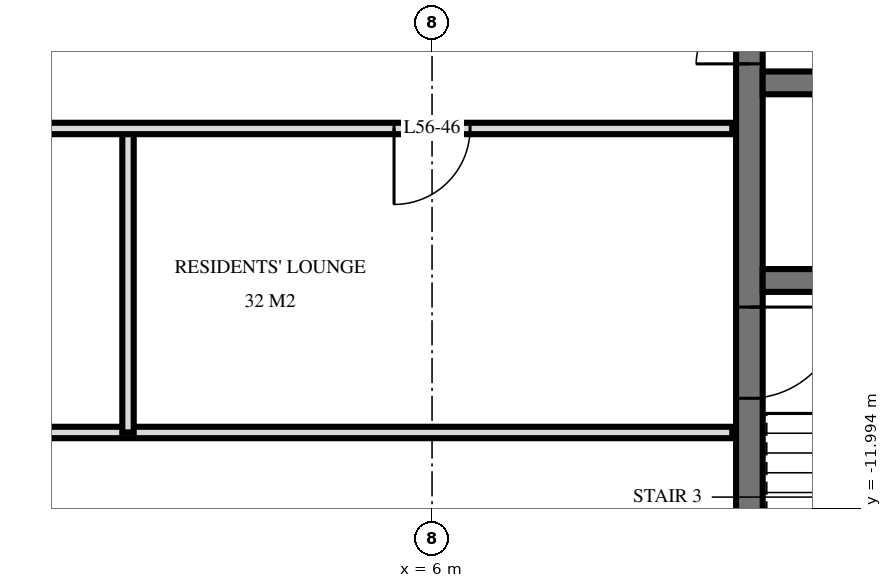
"""IFC4 building model, lengths in metres.
Left out: names, types, materials, properties, quantities, classifications, styles, units other than length and angle.
Written with IfcOpenShell. Run it as: python <this file> out.ifc"""

import sys

from ifc_helpers import new_model, si_unit, direction, frame, frame_2d, origin, place, context, subcontext, project, spatial, rectangle, extrude, element, fill, save


model = new_model("IFC4")
c1 = context("Model", 3, precision=1e-05, world=origin(), true_north=direction((0.0, 1.0)))
c2 = subcontext(c1, "Body", "Model", "MODEL_VIEW")
j1 = project(units=[si_unit("LENGTHUNIT", "METRE"), si_unit("PLANEANGLEUNIT", "RADIAN")], contexts=[c1])
p1 = place(None, origin())
s1 = spatial("IfcSite", under=j1, at=p1, CompositionType="ELEMENT")
p2 = place(p1, origin())
s2 = spatial("IfcBuilding", under=s1, at=p2, CompositionType="ELEMENT")
p3 = place(p2, frame((0.0, 0.0, 215.1)))
s3 = spatial("IfcBuildingStorey", under=s2, at=p3, CompositionType="ELEMENT", Elevation=215.1)
p4 = place(p3, frame((10.175, -14.55, 0.0), z_axis=(0.0, 0.0, 1.0), x_axis=(0.0, 1.0, 0.0)))
e1 = element("IfcWall", 1, at=p4, inside=s3, PredefinedType="SHEAR", context=c2, shape_type="SweptSolid", body=[
    extrude(rectangle(XDim=14.1, YDim=0.35, at=frame_2d((7.05, 0.0))), origin(), (0.0, 0.0, 1.0), 3.5),
])
p5 = place(p4, frame((8.4, 0.0, 0.0)))
e2 = element("IfcOpeningElement", 2, at=p5, cuts=e1, PredefinedType="OPENING", context=c2, shape_type="SweptSolid", body=[
    extrude(rectangle(XDim=1.4, YDim=2.4, at=frame_2d((0.7, 1.2))), frame((0.0, 0.185, 0.0), z_axis=(0.0, -1.0, 0.0), x_axis=(1.0, 0.0, 0.0)), (0.0, 0.0, 1.0), 0.37),
])
p6 = place(p4, frame((10.0, 0.0, 0.0)))
e3 = element("IfcOpeningElement", 3, at=p6, cuts=e1, PredefinedType="OPENING", context=c2, shape_type="SweptSolid", body=[
    extrude(rectangle(XDim=1.4, YDim=2.4, at=frame_2d((0.7, 1.2))), frame((0.0, 0.185, 0.0), z_axis=(0.0, -1.0, 0.0), x_axis=(1.0, 0.0, 0.0)), (0.0, 0.0, 1.0), 0.37),
])
p7 = place(p4, frame((4.0, 0.0, 0.0)))
e4 = element("IfcOpeningElement", 4, at=p7, cuts=e1, PredefinedType="OPENING", context=c2, shape_type="SweptSolid", body=[
    extrude(rectangle(XDim=1.2, YDim=2.1, at=frame_2d((0.6, 1.05))), frame((0.0, 0.185, 0.0), z_axis=(0.0, -1.0, 0.0), x_axis=(1.0, 0.0, 0.0)), (0.0, 0.0, 1.0), 0.37),
])
p8 = place(p3, frame((10.35, -6.4, 0.0), z_axis=(0.0, 0.0, 1.0), x_axis=(1.0, 0.0, 0.0)))
e5 = element("IfcWall", 5, at=p8, inside=s3, PredefinedType="SHEAR", context=c2, shape_type="SweptSolid", body=[
    extrude(rectangle(XDim=13.7, YDim=0.3, at=frame_2d((6.85, 0.0))), origin(), (0.0, 0.0, 1.0), 3.5),
])
p9 = place(p8, frame((12.05, 0.0, 0.0)))
e6 = element("IfcOpeningElement", 6, at=p9, cuts=e5, PredefinedType="OPENING", context=c2, shape_type="SweptSolid", body=[
    extrude(rectangle(XDim=1.1, YDim=2.1, at=frame_2d((0.55, 1.05))), frame((0.0, 0.16, 0.0), z_axis=(0.0, -1.0, 0.0), x_axis=(1.0, 0.0, 0.0)), (0.0, 0.0, 1.0), 0.32),
])
p10 = place(p8, frame((6.8, 0.0, 0.0)))
e7 = element("IfcOpeningElement", 7, at=p10, cuts=e5, PredefinedType="OPENING", context=c2, shape_type="SweptSolid", body=[
    extrude(rectangle(XDim=1.1, YDim=2.1, at=frame_2d((0.55, 1.05))), frame((0.0, 0.16, 0.0), z_axis=(0.0, -1.0, 0.0), x_axis=(1.0, 0.0, 0.0)), (0.0, 0.0, 1.0), 0.32),
])
p11 = place(p3, frame((10.35, -9.0, 0.0), z_axis=(0.0, 0.0, 1.0), x_axis=(1.0, 0.0, 0.0)))
e8 = element("IfcWall", 8, at=p11, inside=s3, PredefinedType="SHEAR", context=c2, shape_type="SweptSolid", body=[
    extrude(rectangle(XDim=13.7, YDim=0.3, at=frame_2d((6.85, 0.0))), origin(), (0.0, 0.0, 1.0), 3.5),
])
p12 = place(p11, frame((3.8, 0.0, 0.0)))
e9 = element("IfcOpeningElement", 9, at=p12, cuts=e8, PredefinedType="OPENING", context=c2, shape_type="SweptSolid", body=[
    extrude(rectangle(XDim=1.1, YDim=2.1, at=frame_2d((0.55, 1.05))), frame((0.0, 0.16, 0.0), z_axis=(0.0, -1.0, 0.0), x_axis=(1.0, 0.0, 0.0)), (0.0, 0.0, 1.0), 0.32),
])
p13 = place(p3, frame((2.0, -11.0, 0.0), z_axis=(0.0, 0.0, 1.0), x_axis=(0.0, 1.0, 0.0)))
e10 = element("IfcWall", 10, at=p13, inside=s3, PredefinedType="PARTITIONING", context=c2, shape_type="SweptSolid", body=[
    extrude(rectangle(XDim=4.0, YDim=0.15, at=frame_2d((2.0, 0.0))), origin(), (0.0, 0.0, 1.0), 3.22),
])
p14 = place(p3, frame((-9.95, -11.0, 0.0), z_axis=(0.0, 0.0, 1.0), x_axis=(1.0, 0.0, 0.0)))
e11 = element("IfcWall", 11, at=p14, inside=s3, PredefinedType="PARTITIONING", context=c2, shape_type="SweptSolid", body=[
    extrude(rectangle(XDim=19.9, YDim=0.15, at=frame_2d((9.95, 0.0))), origin(), (0.0, 0.0, 1.0), 3.22),
])
p15 = place(p14, frame((9.45, 0.0, 0.0)))
e12 = element("IfcOpeningElement", 12, at=p15, cuts=e11, PredefinedType="OPENING", context=c2, shape_type="SweptSolid", body=[
    extrude(rectangle(XDim=1.0, YDim=2.1, at=frame_2d((0.5, 1.05))), frame((0.0, 0.085, 0.0), z_axis=(0.0, -1.0, 0.0), x_axis=(1.0, 0.0, 0.0)), (0.0, 0.0, 1.0), 0.17),
])
p16 = place(p14, frame((3.45, 0.0, 0.0)))
e13 = element("IfcOpeningElement", 13, at=p16, cuts=e11, PredefinedType="OPENING", context=c2, shape_type="SweptSolid", body=[
    extrude(rectangle(XDim=1.0, YDim=2.1, at=frame_2d((0.5, 1.05))), frame((0.0, 0.085, 0.0), z_axis=(0.0, -1.0, 0.0), x_axis=(1.0, 0.0, 0.0)), (0.0, 0.0, 1.0), 0.17),
])
p17 = place(p3, frame((-9.95, -7.0, 0.0), z_axis=(0.0, 0.0, 1.0), x_axis=(1.0, 0.0, 0.0)))
e14 = element("IfcWall", 14, at=p17, inside=s3, PredefinedType="PARTITIONING", context=c2, shape_type="SweptSolid", body=[
    extrude(rectangle(XDim=19.9, YDim=0.15, at=frame_2d((9.95, 0.0))), origin(), (0.0, 0.0, 1.0), 3.22),
])
p18 = place(p17, frame((9.45, 0.0, 0.0)))
e15 = element("IfcOpeningElement", 15, at=p18, cuts=e14, PredefinedType="OPENING", context=c2, shape_type="SweptSolid", body=[
    extrude(rectangle(XDim=1.0, YDim=2.1, at=frame_2d((0.5, 1.05))), frame((0.0, 0.085, 0.0), z_axis=(0.0, -1.0, 0.0), x_axis=(1.0, 0.0, 0.0)), (0.0, 0.0, 1.0), 0.17),
])
p19 = place(p17, frame((15.45, 0.0, 0.0)))
e16 = element("IfcOpeningElement", 16, at=p19, cuts=e14, PredefinedType="OPENING", context=c2, shape_type="SweptSolid", body=[
    extrude(rectangle(XDim=1.0, YDim=2.1, at=frame_2d((0.5, 1.05))), frame((0.0, 0.085, 0.0), z_axis=(0.0, -1.0, 0.0), x_axis=(1.0, 0.0, 0.0)), (0.0, 0.0, 1.0), 0.17),
])
p20 = place(p5, origin())
e17 = element("IfcDoor", 17, at=p20, inside=s3, OperationType="DOUBLE_DOOR_SINGLE_SWING", PredefinedType="DOOR", context=c2, shape_type="SweptSolid", body=[
    extrude(rectangle(XDim=1.4, YDim=2.4, at=frame_2d((0.7, 1.2))), frame((0.0, 0.025, 0.0), z_axis=(0.0, -1.0, 0.0), x_axis=(1.0, 0.0, 0.0)), (0.0, 0.0, 1.0), 0.05),
])
fill(e2, e17)
p21 = place(p7, frame((0.6, 0.0, 0.0), z_axis=(0.0, 0.0, 1.0), x_axis=(-1.0, 0.0, 0.0)))
e18 = element("IfcDoor", 18, at=p21, inside=s3, OperationType="SINGLE_SWING_RIGHT", PredefinedType="DOOR", context=c2, shape_type="SweptSolid", body=[
    extrude(rectangle(XDim=1.2, YDim=2.1, at=frame_2d((0.0, 1.05))), frame((0.0, -0.025, 0.0), z_axis=(0.0, 1.0, 0.0), x_axis=(-1.0, 0.0, 0.0)), (0.0, 0.0, 1.0), 0.05),
])
fill(e4, e18)
p22 = place(p19, frame((0.5, 0.0, 0.0), z_axis=(0.0, 0.0, 1.0), x_axis=(-1.0, 0.0, 0.0)))
e19 = element("IfcDoor", 19, at=p22, inside=s3, OperationType="SINGLE_SWING_LEFT", PredefinedType="DOOR", context=c2, shape_type="SweptSolid", body=[
    extrude(rectangle(XDim=1.0, YDim=2.1, at=frame_2d((0.0, 1.05))), frame((0.0, -0.025, 0.0), z_axis=(0.0, 1.0, 0.0), x_axis=(-1.0, 0.0, 0.0)), (0.0, 0.0, 1.0), 0.05),
])
fill(e16, e19)
save(model, sys.argv[1])
